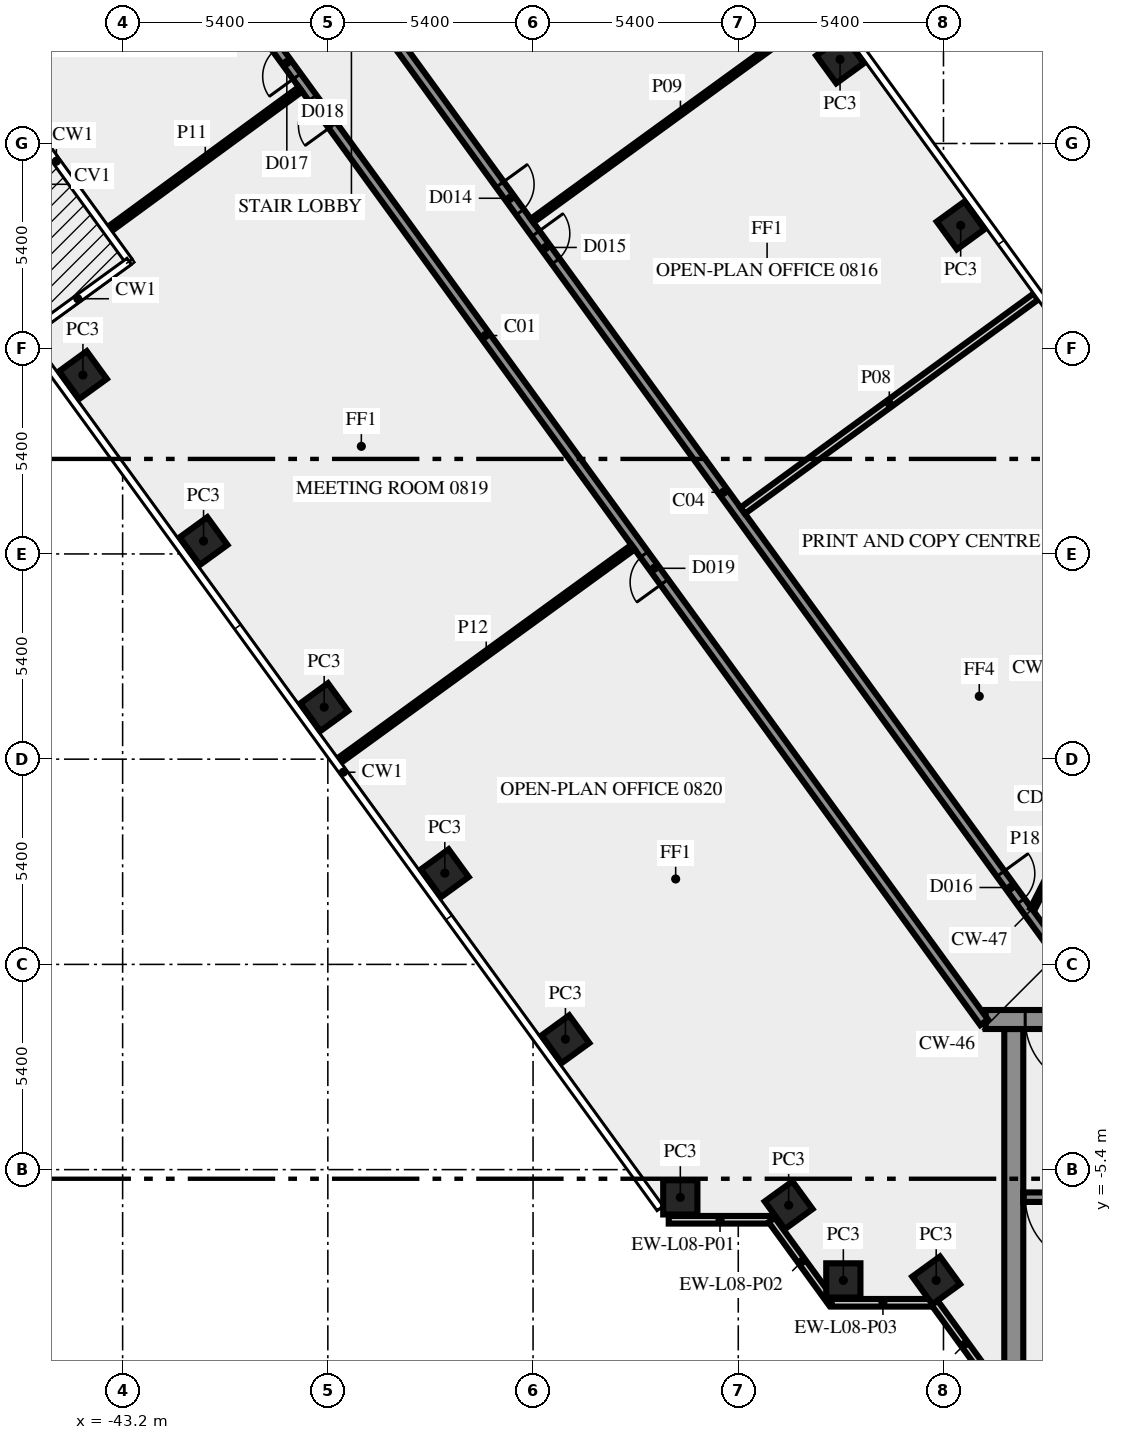
"""IFC4 building model, lengths in metres.
Left out: names, types, materials, properties, quantities, classifications, styles, units other than length and angle.
Written with IfcOpenShell. Run it as: python <this file> out.ifc"""

import sys

from ifc_helpers import new_model, si_unit, direction, frame, frame_2d, origin, origin_2d, place, context, subcontext, project, spatial, rectangle, extrude, element, fill, save


model = new_model("IFC4")
c1 = context("Model", 3, precision=1e-05, world=origin(), true_north=direction((0.0, 1.0)))
c2 = subcontext(c1, "Body", "Model", "MODEL_VIEW")
j1 = project(units=[si_unit("LENGTHUNIT", "METRE"), si_unit("PLANEANGLEUNIT", "RADIAN")], contexts=[c1])
p1 = place(None, origin())
s1 = spatial("IfcSite", under=j1, at=p1, CompositionType="ELEMENT")
p2 = place(p1, origin())
s2 = spatial("IfcBuilding", under=s1, at=p2, CompositionType="ELEMENT")
p3 = place(p2, frame((0.0, 0.0, 39.0)))
s3 = spatial("IfcBuildingStorey", under=s2, at=p3, CompositionType="ELEMENT", Elevation=39.0)
for number, where, z_axis, x_axis in (
    (1, (-21.147, 19.444, 0.0), (0.0, 0.0, 1.0), (-0.588, 0.809, 0.0)),
    (2, (-24.321, 23.812, 0.0), (0.0, 0.0, 1.0), (-0.588, 0.809, 0.0)),
    (3, (-44.244, 15.506, 0.0), (0.0, 0.0, 1.0), (0.588, -0.809, 0.0)),
    (4, (-41.07, 11.137, 0.0), (0.0, 0.0, 1.0), (0.588, -0.809, 0.0)),
    (5, (-37.896, 6.769, 0.0), (0.0, 0.0, 1.0), (0.588, -0.809, 0.0)),
    (6, (-34.722, 2.4, 0.0), (0.0, 0.0, 1.0), (0.588, -0.809, 0.0)),
    (7, (-31.548, -1.969, 0.0), (0.0, 0.0, 1.0), (0.588, -0.809, 0.0)),
    (8, (-28.525, -6.13, 0.0), (0.0, 0.0, 1.0), (1.0, 0.0, 0.0)),
    (9, (-25.674, -6.337, 0.0), (0.0, 0.0, 1.0), (0.588, -0.809, 0.0)),
    (10, (-24.235, -8.315, 0.0), (0.0, 0.0, 1.0), (1.0, 0.0, 0.0)),
    (11, (-21.792, -8.315, 0.0), (0.0, 0.0, 1.0), (0.588, -0.809, 0.0)),
):
    element("IfcColumn", number, at=place(p3, frame(where, z_axis=z_axis, x_axis=x_axis)), inside=s3, PredefinedType="COLUMN", context=c2, shape_type="SweptSolid", body=[
        extrude(rectangle(XDim=0.9, YDim=0.9, at=origin_2d()), origin(), (0.0, 0.0, 1.0), 3.65),
    ])
p4 = place(p3, frame((-28.83, -6.719, 0.0), z_axis=(0.0, 0.0, 1.0), x_axis=(1.0, 0.0, 0.0)))
e12 = element("IfcWall", 12, at=p4, inside=s3, PredefinedType="SOLIDWALL", context=c2, shape_type="SweptSolid", body=[
    extrude(rectangle(XDim=2.7, YDim=0.2, at=frame_2d((1.35, 0.0))), origin(), (0.0, 0.0, 1.0), 3.65),
])
p5 = place(p3, frame((-26.12, -6.724, 0.0), z_axis=(0.0, 0.0, 1.0), x_axis=(0.587720002413, -0.809064397168, 0.0)))
e13 = element("IfcWall", 13, at=p5, inside=s3, PredefinedType="SOLIDWALL", context=c2, shape_type="SweptSolid", body=[
    extrude(rectangle(XDim=2.7, YDim=0.2, at=frame_2d((1.35, 0.0))), origin(), (0.0, 0.0, 1.0), 3.65),
])
p6 = place(p3, frame((-24.543, -8.904, 0.0), z_axis=(0.0, 0.0, 1.0), x_axis=(1.0, 0.0, 0.0)))
e14 = element("IfcWall", 14, at=p6, inside=s3, PredefinedType="SOLIDWALL", context=c2, shape_type="SweptSolid", body=[
    extrude(rectangle(XDim=2.7, YDim=0.2, at=frame_2d((1.35, 0.0))), origin(), (0.0, 0.0, 1.0), 3.65),
])
p7 = place(p3, frame((-21.833, -8.909, 0.0), z_axis=(0.0, 0.0, 1.0), x_axis=(0.587766567315, -0.809030569476, 0.0)))
e15 = element("IfcWall", 15, at=p7, inside=s3, PredefinedType="SOLIDWALL", context=c2, shape_type="SweptSolid", body=[
    extrude(rectangle(XDim=2.688, YDim=0.2, at=frame_2d((1.344, 0.0))), origin(), (0.0, 0.0, 1.0), 3.65),
])
p8 = place(p3, frame((-19.75, -10.5, 0.0), z_axis=(0.0, 0.0, 1.0), x_axis=(0.0, 1.0, 0.0)))
e16 = element("IfcWall", 16, at=p8, inside=s3, PredefinedType="SHEAR", context=c2, shape_type="SweptSolid", body=[
    extrude(rectangle(XDim=8.8, YDim=0.5, at=frame_2d((4.4, 0.0))), origin(), (0.0, 0.0, 1.0), 3.65),
])
p9 = place(p3, frame((-11.45, -6.125, 0.0), z_axis=(0.0, 0.0, 1.0), x_axis=(-1.0, 0.0, 0.0)))
e17 = element("IfcWall", 17, at=p9, inside=s3, PredefinedType="SHEAR", context=c2, shape_type="SweptSolid", body=[
    extrude(rectangle(XDim=8.05, YDim=0.25, at=frame_2d((4.025, 0.0))), origin(), (0.0, 0.0, 1.0), 3.65),
])
p10 = place(p9, frame((6.2, 0.0, 0.0)))
e18 = element("IfcOpeningElement", 18, at=p10, cuts=e17, PredefinedType="OPENING", context=c2, shape_type="SweptSolid", body=[
    extrude(rectangle(XDim=1.8, YDim=2.1, at=frame_2d((0.9, 1.05))), frame((0.0, 0.135, 0.0), z_axis=(0.0, -1.0, 0.0), x_axis=(1.0, 0.0, 0.0)), (0.0, 0.0, 1.0), 0.27),
])
p11 = place(p3, frame((20.49, -1.45, 0.0), z_axis=(0.0, 0.0, 1.0), x_axis=(-1.0, 0.0, 0.0)))
e19 = element("IfcWall", 19, at=p11, inside=s3, PredefinedType="SHEAR", context=c2, shape_type="SweptSolid", body=[
    extrude(rectangle(XDim=40.98, YDim=0.5, at=frame_2d((20.49, 0.0))), origin(), (0.0, 0.0, 1.0), 3.65),
])
p12 = place(p11, frame((38.14, 0.0, 0.0)))
e20 = element("IfcOpeningElement", 20, at=p12, cuts=e19, PredefinedType="OPENING", context=c2, shape_type="SweptSolid", body=[
    extrude(rectangle(XDim=1.8, YDim=2.1, at=frame_2d((0.9, 1.05))), frame((0.0, 0.26, 0.0), z_axis=(0.0, -1.0, 0.0), x_axis=(1.0, 0.0, 0.0)), (0.0, 0.0, 1.0), 0.52),
])
p13 = place(p11, frame((36.728, 0.0, 0.0)))
e21 = element("IfcOpeningElement", 21, at=p13, cuts=e19, PredefinedType="OPENING", context=c2, shape_type="SweptSolid", body=[
    extrude(rectangle(XDim=0.8, YDim=2.1, at=frame_2d((0.4, 1.05))), frame((0.0, 0.26, 0.0), z_axis=(0.0, -1.0, 0.0), x_axis=(1.0, 0.0, 0.0)), (0.0, 0.0, 1.0), 0.52),
])
p14 = place(p11, frame((35.153, 0.0, 0.0)))
e22 = element("IfcOpeningElement", 22, at=p14, cuts=e19, PredefinedType="OPENING", context=c2, shape_type="SweptSolid", body=[
    extrude(rectangle(XDim=0.8, YDim=2.1, at=frame_2d((0.4, 1.05))), frame((0.0, 0.26, 0.0), z_axis=(0.0, -1.0, 0.0), x_axis=(1.0, 0.0, 0.0)), (0.0, 0.0, 1.0), 0.52),
])
p15 = place(p11, frame((32.94, 0.0, 0.0)))
e23 = element("IfcOpeningElement", 23, at=p15, cuts=e19, PredefinedType="OPENING", context=c2, shape_type="SweptSolid", body=[
    extrude(rectangle(XDim=0.9, YDim=2.1, at=frame_2d((0.45, 1.05))), frame((0.0, 0.26, 0.0), z_axis=(0.0, -1.0, 0.0), x_axis=(1.0, 0.0, 0.0)), (0.0, 0.0, 1.0), 0.52),
])
p16 = place(p11, frame((21.765, 0.0, 0.0)))
e24 = element("IfcOpeningElement", 24, at=p16, cuts=e19, PredefinedType="OPENING", context=c2, shape_type="SweptSolid", body=[
    extrude(rectangle(XDim=2.0, YDim=2.1, at=frame_2d((1.0, 1.05))), frame((0.0, 0.26, 0.0), z_axis=(0.0, -1.0, 0.0), x_axis=(1.0, 0.0, 0.0)), (0.0, 0.0, 1.0), 0.52),
])
p17 = place(p11, frame((7.14, 0.0, 0.0)))
e25 = element("IfcOpeningElement", 25, at=p17, cuts=e19, PredefinedType="OPENING", context=c2, shape_type="SweptSolid", body=[
    extrude(rectangle(XDim=0.9, YDim=2.1, at=frame_2d((0.45, 1.05))), frame((0.0, 0.26, 0.0), z_axis=(0.0, -1.0, 0.0), x_axis=(1.0, 0.0, 0.0)), (0.0, 0.0, 1.0), 0.52),
])
p18 = place(p11, frame((4.19, 0.0, 0.0)))
e26 = element("IfcOpeningElement", 26, at=p18, cuts=e19, PredefinedType="OPENING", context=c2, shape_type="SweptSolid", body=[
    extrude(rectangle(XDim=0.9, YDim=2.1, at=frame_2d((0.45, 1.05))), frame((0.0, 0.26, 0.0), z_axis=(0.0, -1.0, 0.0), x_axis=(1.0, 0.0, 0.0)), (0.0, 0.0, 1.0), 0.52),
])
p19 = place(p11, frame((1.04, 0.0, 0.0)))
e27 = element("IfcOpeningElement", 27, at=p19, cuts=e19, PredefinedType="OPENING", context=c2, shape_type="SweptSolid", body=[
    extrude(rectangle(XDim=1.8, YDim=2.1, at=frame_2d((0.9, 1.05))), frame((0.0, 0.26, 0.0), z_axis=(0.0, -1.0, 0.0), x_axis=(1.0, 0.0, 0.0)), (0.0, 0.0, 1.0), 0.52),
])
p20 = place(p3, frame((-20.531, -1.523, 0.0), z_axis=(0.0, 0.0, 1.0), x_axis=(-0.587784593204, 0.809017473231, 0.0)))
e28 = element("IfcWall", 28, at=p20, inside=s3, PredefinedType="SOLIDWALL", context=c2, shape_type="SweptSolid", body=[
    extrude(rectangle(XDim=44.67, YDim=0.25, at=frame_2d((22.335, 0.0))), origin(), (0.0, 0.0, 1.0), 3.65),
])
p21 = place(p20, frame((30.765, 0.0, 0.0)))
e29 = element("IfcOpeningElement", 29, at=p21, cuts=e28, PredefinedType="OPENING", context=c2, shape_type="SweptSolid", body=[
    extrude(rectangle(XDim=0.9, YDim=2.1, at=frame_2d((0.45, 1.05))), frame((0.0, 0.135, 0.0), z_axis=(0.0, -1.0, 0.0), x_axis=(1.0, 0.0, 0.0)), (0.0, 0.0, 1.0), 0.27),
])
p22 = place(p20, frame((14.316, 0.0, 0.0)))
e30 = element("IfcOpeningElement", 30, at=p22, cuts=e28, PredefinedType="OPENING", context=c2, shape_type="SweptSolid", body=[
    extrude(rectangle(XDim=0.9, YDim=2.1, at=frame_2d((0.45, 1.05))), frame((0.0, 0.135, 0.0), z_axis=(0.0, -1.0, 0.0), x_axis=(1.0, 0.0, 0.0)), (0.0, 0.0, 1.0), 0.27),
])
p23 = place(p20, frame((29.166, 0.0, 0.0)))
e31 = element("IfcOpeningElement", 31, at=p23, cuts=e28, PredefinedType="OPENING", context=c2, shape_type="SweptSolid", body=[
    extrude(rectangle(XDim=0.9, YDim=2.1, at=frame_2d((0.45, 1.05))), frame((0.0, 0.135, 0.0), z_axis=(0.0, -1.0, 0.0), x_axis=(1.0, 0.0, 0.0)), (0.0, 0.0, 1.0), 0.27),
])
p24 = place(p3, frame((-37.232, 25.972, 0.0), z_axis=(0.0, 0.0, 1.0), x_axis=(0.587786323093, -0.809016216391, 0.0)))
e32 = element("IfcWall", 32, at=p24, inside=s3, PredefinedType="SOLIDWALL", context=c2, shape_type="SweptSolid", body=[
    extrude(rectangle(XDim=33.493, YDim=0.25, at=frame_2d((16.747, 0.0))), origin(), (0.0, 0.0, 1.0), 3.65),
])
p25 = place(p24, frame((8.335, 0.0, 0.0)))
e33 = element("IfcOpeningElement", 33, at=p25, cuts=e32, PredefinedType="OPENING", context=c2, shape_type="SweptSolid", body=[
    extrude(rectangle(XDim=0.9, YDim=2.1, at=frame_2d((0.45, 1.05))), frame((0.0, 0.135, 0.0), z_axis=(0.0, -1.0, 0.0), x_axis=(1.0, 0.0, 0.0)), (0.0, 0.0, 1.0), 0.27),
])
p26 = place(p24, frame((29.152, 0.0, 0.0)))
e34 = element("IfcOpeningElement", 34, at=p26, cuts=e32, PredefinedType="OPENING", context=c2, shape_type="SweptSolid", body=[
    extrude(rectangle(XDim=0.9, YDim=2.1, at=frame_2d((0.45, 1.05))), frame((0.0, 0.135, 0.0), z_axis=(0.0, -1.0, 0.0), x_axis=(1.0, 0.0, 0.0)), (0.0, 0.0, 1.0), 0.27),
])
p27 = place(p24, frame((6.735, 0.0, 0.0)))
e35 = element("IfcOpeningElement", 35, at=p27, cuts=e32, PredefinedType="OPENING", context=c2, shape_type="SweptSolid", body=[
    extrude(rectangle(XDim=0.9, YDim=2.1, at=frame_2d((0.45, 1.05))), frame((0.0, 0.135, 0.0), z_axis=(0.0, -1.0, 0.0), x_axis=(1.0, 0.0, 0.0)), (0.0, 0.0, 1.0), 0.27),
])
p28 = place(p3, frame((-26.882, 11.94, 0.0), z_axis=(0.0, 0.0, 1.0), x_axis=(0.807664588563, 0.589642190131, 0.0)))
e36 = element("IfcWall", 36, at=p28, inside=s3, PredefinedType="SOLIDWALL", context=c2, shape_type="SweptSolid", body=[
    extrude(rectangle(XDim=9.55, YDim=0.2, at=frame_2d((4.775, 0.0))), origin(), (0.0, 0.0, 1.0), 2.75),
])
p29 = place(p3, frame((-24.618, 25.242, 0.0), z_axis=(0.0, 0.0, 1.0), x_axis=(-0.809002920164, -0.587804623294, 0.0)))
e37 = element("IfcWall", 37, at=p29, inside=s3, PredefinedType="PARTITIONING", context=c2, shape_type="SweptSolid", body=[
    extrude(rectangle(XDim=9.651, YDim=0.12, at=frame_2d((4.825, 0.0))), origin(), (0.0, 0.0, 1.0), 2.75),
])
p30 = place(p3, frame((-43.529, 19.358, 0.0), z_axis=(0.0, 0.0, 1.0), x_axis=(0.806712484859, 0.590944131685, 0.0)))
e38 = element("IfcWall", 38, at=p30, inside=s3, PredefinedType="PARTITIONING", context=c2, shape_type="SweptSolid", body=[
    extrude(rectangle(XDim=6.207, YDim=0.15, at=frame_2d((3.104, 0.0))), origin(), (0.0, 0.0, 1.0), 3.65),
])
p31 = place(p3, frame((-29.769, 10.98, 0.0), z_axis=(0.0, 0.0, 1.0), x_axis=(-0.809036661777, -0.587758181483, 0.0)))
e39 = element("IfcWall", 39, at=p31, inside=s3, PredefinedType="PARTITIONING", context=c2, shape_type="SweptSolid", body=[
    extrude(rectangle(XDim=9.55, YDim=0.15, at=frame_2d((4.775, 0.0))), origin(), (0.0, 0.0, 1.0), 2.75),
])
p32 = place(p3, frame((-19.261, 1.45, 0.0), z_axis=(0.0, 0.0, 1.0), x_axis=(0.453950796792, 0.891026752736, 0.0)))
e40 = element("IfcWall", 40, at=p32, inside=s3, PredefinedType="PARTITIONING", context=c2, shape_type="SweptSolid", body=[
    extrude(rectangle(XDim=2.778, YDim=0.12, at=frame_2d((1.389, 0.0))), origin(), (0.0, 0.0, 1.0), 3.65),
])
p33 = place(p10, origin())
e41 = element("IfcDoor", 41, at=p33, inside=s3, OperationType="DOUBLE_DOOR_SINGLE_SWING", PredefinedType="DOOR", context=c2, shape_type="SweptSolid", body=[
    extrude(rectangle(XDim=1.8, YDim=2.1, at=frame_2d((0.9, 1.05))), frame((0.0, 0.025, 0.0), z_axis=(0.0, -1.0, 0.0), x_axis=(1.0, 0.0, 0.0)), (0.0, 0.0, 1.0), 0.05),
])
fill(e18, e41)
p34 = place(p12, origin())
e42 = element("IfcDoor", 42, at=p34, inside=s3, OperationType="DOUBLE_DOOR_SINGLE_SWING", PredefinedType="DOOR", context=c2, shape_type="SweptSolid", body=[
    extrude(rectangle(XDim=1.8, YDim=2.1, at=frame_2d((0.9, 1.05))), frame((0.0, 0.025, 0.0), z_axis=(0.0, -1.0, 0.0), x_axis=(1.0, 0.0, 0.0)), (0.0, 0.0, 1.0), 0.05),
])
fill(e20, e42)
p35 = place(p25, origin())
e43 = element("IfcDoor", 43, at=p35, inside=s3, OperationType="SINGLE_SWING_LEFT", PredefinedType="DOOR", context=c2, shape_type="SweptSolid", body=[
    extrude(rectangle(XDim=0.9, YDim=2.1, at=frame_2d((0.45, 1.05))), frame((0.0, 0.025, 0.0), z_axis=(0.0, -1.0, 0.0), x_axis=(1.0, 0.0, 0.0)), (0.0, 0.0, 1.0), 0.05),
])
fill(e33, e43)
p36 = place(p21, origin())
e44 = element("IfcDoor", 44, at=p36, inside=s3, OperationType="SINGLE_SWING_LEFT", PredefinedType="DOOR", context=c2, shape_type="SweptSolid", body=[
    extrude(rectangle(XDim=0.9, YDim=2.1, at=frame_2d((0.45, 1.05))), frame((0.0, 0.025, 0.0), z_axis=(0.0, -1.0, 0.0), x_axis=(1.0, 0.0, 0.0)), (0.0, 0.0, 1.0), 0.05),
])
fill(e29, e44)
p37 = place(p22, origin())
e45 = element("IfcDoor", 45, at=p37, inside=s3, OperationType="SINGLE_SWING_RIGHT", PredefinedType="DOOR", context=c2, shape_type="SweptSolid", body=[
    extrude(rectangle(XDim=0.9, YDim=2.1, at=frame_2d((0.45, 1.05))), frame((0.0, 0.025, 0.0), z_axis=(0.0, -1.0, 0.0), x_axis=(1.0, 0.0, 0.0)), (0.0, 0.0, 1.0), 0.05),
])
fill(e30, e45)
p38 = place(p23, origin())
e46 = element("IfcDoor", 46, at=p38, inside=s3, OperationType="SINGLE_SWING_RIGHT", PredefinedType="DOOR", context=c2, shape_type="SweptSolid", body=[
    extrude(rectangle(XDim=0.9, YDim=2.1, at=frame_2d((0.45, 1.05))), frame((0.0, 0.025, 0.0), z_axis=(0.0, -1.0, 0.0), x_axis=(1.0, 0.0, 0.0)), (0.0, 0.0, 1.0), 0.05),
])
fill(e31, e46)
p39 = place(p26, origin())
e47 = element("IfcDoor", 47, at=p39, inside=s3, OperationType="SINGLE_SWING_RIGHT", PredefinedType="DOOR", context=c2, shape_type="SweptSolid", body=[
    extrude(rectangle(XDim=0.9, YDim=2.1, at=frame_2d((0.45, 1.05))), frame((0.0, 0.025, 0.0), z_axis=(0.0, -1.0, 0.0), x_axis=(1.0, 0.0, 0.0)), (0.0, 0.0, 1.0), 0.05),
])
fill(e34, e47)
p40 = place(p27, origin())
e48 = element("IfcDoor", 48, at=p40, inside=s3, OperationType="SINGLE_SWING_RIGHT", PredefinedType="DOOR", context=c2, shape_type="SweptSolid", body=[
    extrude(rectangle(XDim=0.9, YDim=2.1, at=frame_2d((0.45, 1.05))), frame((0.0, 0.025, 0.0), z_axis=(0.0, -1.0, 0.0), x_axis=(1.0, 0.0, 0.0)), (0.0, 0.0, 1.0), 0.05),
])
fill(e35, e48)
save(model, sys.argv[1])
